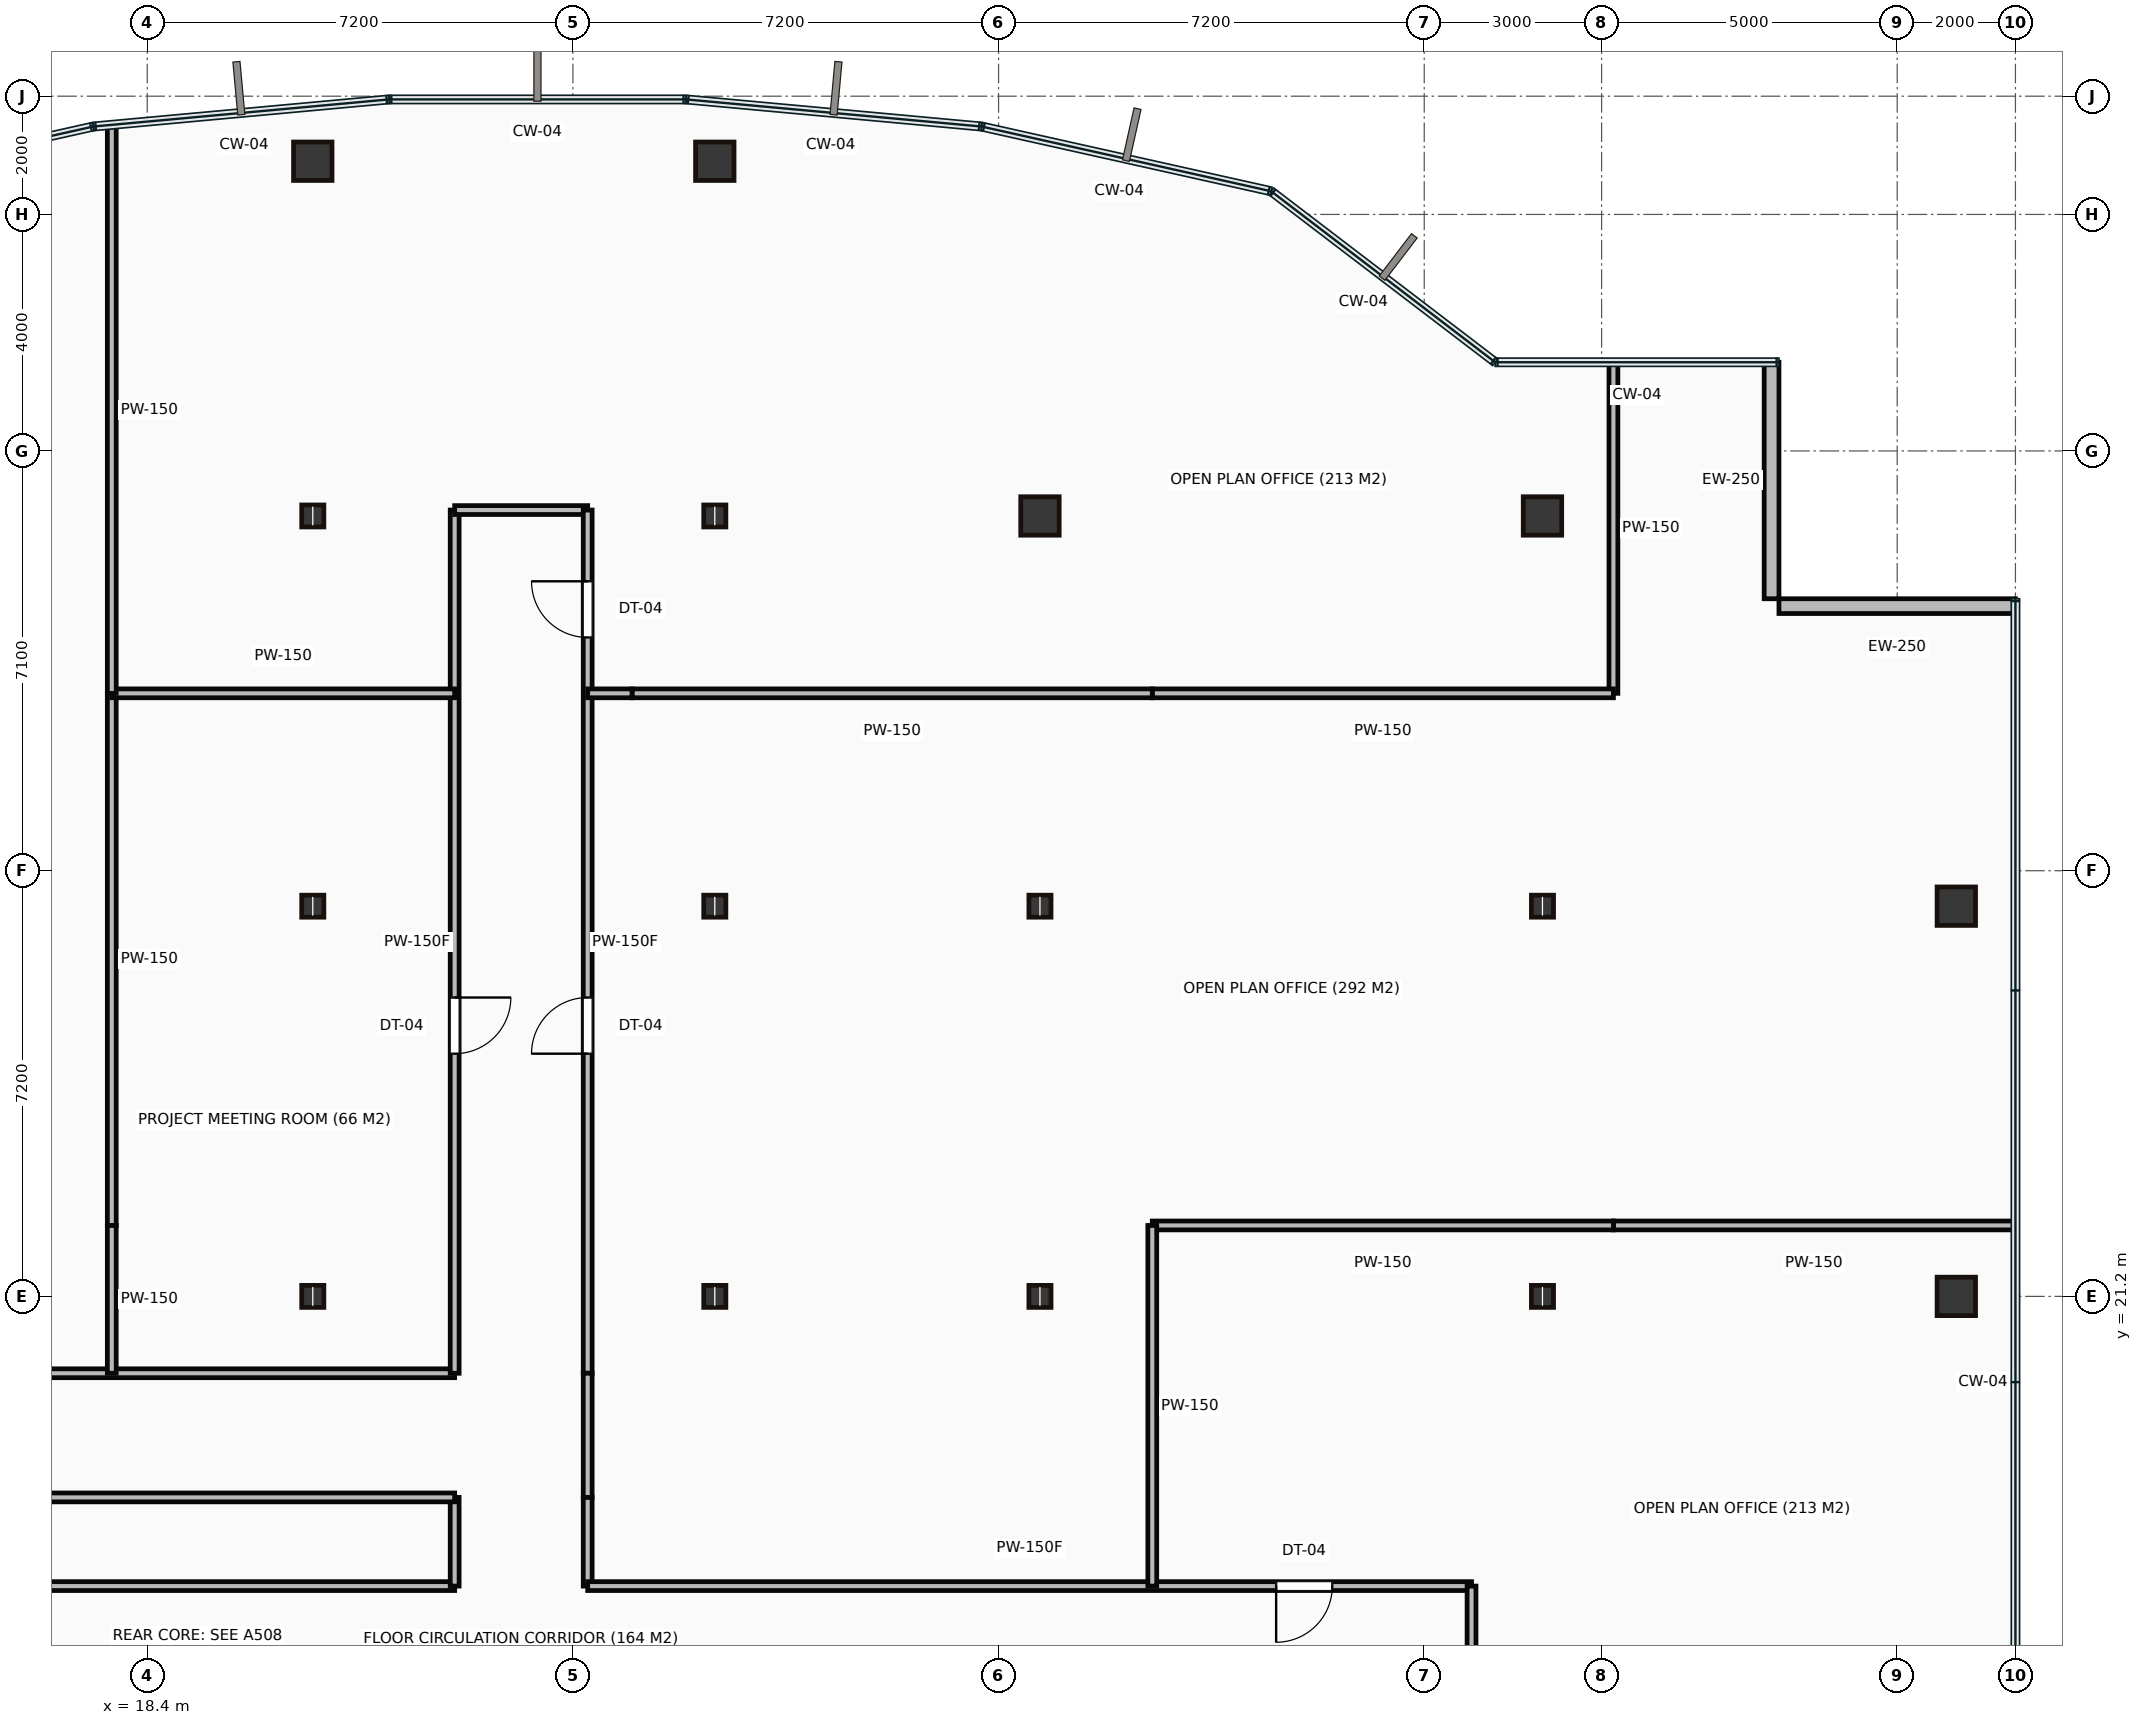
"""IFC4 building model, lengths in metres.
Left out: names, types, materials, properties, quantities, classifications, styles, units other than length and angle.
Written with IfcOpenShell. Run it as: python <this file> out.ifc"""

import sys

from ifc_helpers import new_model, si_unit, direction, frame, frame_2d, origin, origin_2d, place, context, subcontext, project, spatial, rectangle, hollow_rectangle, i_section, extrude, source, transform, mapped, element, fill, save


model = new_model("IFC4")
c1 = context("Model", 3, precision=1e-05, world=origin(), true_north=direction((0.0, 1.0)))
c2 = subcontext(c1, "Body", "Model", "MODEL_VIEW")
j1 = project(units=[si_unit("LENGTHUNIT", "METRE"), si_unit("PLANEANGLEUNIT", "RADIAN")], contexts=[c1])
p1 = place(None, origin())
s1 = spatial("IfcSite", under=j1, at=p1, CompositionType="ELEMENT")
p2 = place(p1, origin())
s2 = spatial("IfcBuilding", under=s1, at=p2, CompositionType="ELEMENT")
p3 = place(p2, frame((0.0, 0.0, 177.1)))
s3 = spatial("IfcBuildingStorey", under=s2, at=p3, CompositionType="ELEMENT", Elevation=177.1)
m1 = source(origin(), c2, "Body", "SweptSolid", [
    extrude(i_section(OverallWidth=0.374, OverallDepth=0.372, WebThickness=0.016, FlangeThickness=0.026, at=origin_2d()), origin(), (0.0, 0.0, 1.0), 3.65),
])
for number, where, z_axis, x_axis in (
    (1, (21.2, 21.2, 0.0), (0.0, 0.0, 1.0), (1.0, 0.0, 0.0)),
    (2, (21.2, 27.8, 0.0), (0.0, 0.0, 1.0), (1.0, 0.0, 0.0)),
    (3, (21.2, 34.4, 0.0), (0.0, 0.0, 1.0), (1.0, 0.0, 0.0)),
):
    element("IfcColumn", number, at=place(p3, frame(where, z_axis=z_axis, x_axis=x_axis)), inside=s3, PredefinedType="COLUMN", context=c2, shape_type="MappedRepresentation", body=[
        mapped(m1, transform((0.0, 0.0, 0.0))),
    ])
m2 = source(origin(), c2, "Body", "SweptSolid", [
    extrude(hollow_rectangle(XDim=0.65, YDim=0.65, WallThickness=0.032, at=origin_2d()), origin(), (0.0, 0.0, 1.0), 3.65),
])
p4 = place(p3, frame((21.2, 40.4, 0.0), z_axis=(0.0, 0.0, 1.0), x_axis=(1.0, 0.0, 0.0)))
e4 = element("IfcColumn", 4, at=p4, inside=s3, PredefinedType="COLUMN", context=c2, shape_type="MappedRepresentation", body=[
    mapped(m2, transform((0.0, 0.0, 0.0))),
])
for number, where, z_axis, x_axis in (
    (5, (28.0, 21.2, 0.0), (0.0, 0.0, 1.0), (1.0, 0.0, 0.0)),
    (6, (28.0, 27.8, 0.0), (0.0, 0.0, 1.0), (1.0, 0.0, 0.0)),
    (7, (28.0, 34.4, 0.0), (0.0, 0.0, 1.0), (1.0, 0.0, 0.0)),
):
    element("IfcColumn", number, at=place(p3, frame(where, z_axis=z_axis, x_axis=x_axis)), inside=s3, PredefinedType="COLUMN", context=c2, shape_type="MappedRepresentation", body=[
        mapped(m1, transform((0.0, 0.0, 0.0))),
    ])
p5 = place(p3, frame((28.0, 40.4, 0.0), z_axis=(0.0, 0.0, 1.0), x_axis=(1.0, 0.0, 0.0)))
e8 = element("IfcColumn", 8, at=p5, inside=s3, PredefinedType="COLUMN", context=c2, shape_type="MappedRepresentation", body=[
    mapped(m2, transform((0.0, 0.0, 0.0))),
])
for number, where, z_axis, x_axis in (
    (9, (33.5, 21.2, 0.0), (0.0, 0.0, 1.0), (1.0, 0.0, 0.0)),
    (10, (33.5, 27.8, 0.0), (0.0, 0.0, 1.0), (1.0, 0.0, 0.0)),
):
    element("IfcColumn", number, at=place(p3, frame(where, z_axis=z_axis, x_axis=x_axis)), inside=s3, PredefinedType="COLUMN", context=c2, shape_type="MappedRepresentation", body=[
        mapped(m1, transform((0.0, 0.0, 0.0))),
    ])
p6 = place(p3, frame((33.5, 34.4, 0.0), z_axis=(0.0, 0.0, 1.0), x_axis=(1.0, 0.0, 0.0)))
e11 = element("IfcColumn", 11, at=p6, inside=s3, PredefinedType="COLUMN", context=c2, shape_type="MappedRepresentation", body=[
    mapped(m2, transform((0.0, 0.0, 0.0))),
])
for number, where, z_axis, x_axis in (
    (12, (42.0, 21.2, 0.0), (0.0, 0.0, 1.0), (1.0, 0.0, 0.0)),
    (13, (42.0, 27.8, 0.0), (0.0, 0.0, 1.0), (1.0, 0.0, 0.0)),
):
    element("IfcColumn", number, at=place(p3, frame(where, z_axis=z_axis, x_axis=x_axis)), inside=s3, PredefinedType="COLUMN", context=c2, shape_type="MappedRepresentation", body=[
        mapped(m1, transform((0.0, 0.0, 0.0))),
    ])
for number, where, z_axis, x_axis in (
    (14, (42.0, 34.4, 0.0), (0.0, 0.0, 1.0), (1.0, 0.0, 0.0)),
    (15, (49.0, 21.2, 0.0), (0.0, 0.0, 1.0), (1.0, 0.0, 0.0)),
    (16, (49.0, 27.8, 0.0), (0.0, 0.0, 1.0), (1.0, 0.0, 0.0)),
):
    element("IfcColumn", number, at=place(p3, frame(where, z_axis=z_axis, x_axis=x_axis)), inside=s3, PredefinedType="COLUMN", context=c2, shape_type="MappedRepresentation", body=[
        mapped(m2, transform((0.0, 0.0, 0.0))),
    ])
m3 = source(origin(), c2, "Body", "SweptSolid", [
    extrude(rectangle(XDim=4.0, YDim=0.25, at=frame_2d((2.0, 0.0))), origin(), (0.0, 0.0, 1.0), 3.4),
])
for number, where, z_axis, x_axis in (
    (17, (50.0, 32.875, 0.0), (0.0, 0.0, 1.0), (-1.0, 0.0, 0.0)),
    (18, (45.875, 33.0, 0.0), (0.0, 0.0, 1.0), (0.0, 1.0, 0.0)),
):
    element("IfcWall", number, at=place(p3, frame(where, z_axis=z_axis, x_axis=x_axis)), inside=s3, PredefinedType="STANDARD", context=c2, shape_type="MappedRepresentation", body=[
        mapped(m3, transform((0.0, 0.0, 0.0))),
    ])
m4 = source(origin(), c2, "Body", "SweptSolid", [
    extrude(rectangle(XDim=19.0, YDim=0.15, at=frame_2d((9.5, 0.0))), origin(), (0.0, 0.0, 1.0), 3.4),
])
p7 = place(p3, frame((4.6, 16.3, 0.0), z_axis=(0.0, 0.0, 1.0), x_axis=(1.0, 0.0, 0.0)))
e19 = element("IfcWall", 19, at=p7, inside=s3, PredefinedType="PARTITIONING", context=c2, shape_type="MappedRepresentation", body=[
    mapped(m4, transform((0.0, 0.0, 0.0))),
])
p8 = place(p7, frame((9.025, 0.0, 0.0)))
e20 = element("IfcOpeningElement", 20, at=p8, cuts=e19, PredefinedType="OPENING", context=c2, shape_type="SweptSolid", body=[
    extrude(rectangle(XDim=0.95, YDim=2.15, at=frame_2d((0.475, 1.075))), frame((0.0, 0.085, 0.0), z_axis=(0.0, -1.0, 0.0), x_axis=(1.0, 0.0, 0.0)), (0.0, 0.0, 1.0), 0.17),
])
m5 = source(origin(), c2, "Body", "SweptSolid", [
    extrude(rectangle(XDim=1.5, YDim=0.15, at=frame_2d((0.75, 0.0))), origin(), (0.0, 0.0, 1.0), 3.4),
])
p9 = place(p3, frame((23.6, 16.3, 0.0), z_axis=(0.0, 0.0, 1.0), x_axis=(0.0, 1.0, 0.0)))
e21 = element("IfcWall", 21, at=p9, inside=s3, PredefinedType="PARTITIONING", context=c2, shape_type="MappedRepresentation", body=[
    mapped(m5, transform((0.0, 0.0, 0.0))),
])
for number, where, z_axis, x_axis in (
    (22, (23.6, 17.8, 0.0), (0.0, 0.0, 1.0), (-1.0, 0.0, 0.0)),
    (23, (4.6, 19.9, 0.0), (0.0, 0.0, 1.0), (1.0, 0.0, 0.0)),
):
    element("IfcWall", number, at=place(p3, frame(where, z_axis=z_axis, x_axis=x_axis)), inside=s3, PredefinedType="PARTITIONING", context=c2, shape_type="MappedRepresentation", body=[
        mapped(m4, transform((0.0, 0.0, 0.0))),
    ])
m6 = source(origin(), c2, "Body", "SweptSolid", [
    extrude(rectangle(XDim=14.6, YDim=0.15, at=frame_2d((7.3, 0.0))), origin(), (0.0, 0.0, 1.0), 3.4),
])
p10 = place(p3, frame((23.6, 19.9, 0.0), z_axis=(0.0, 0.0, 1.0), x_axis=(0.0, 1.0, 0.0)))
e24 = element("IfcWall", 24, at=p10, inside=s3, PredefinedType="PARTITIONING", context=c2, shape_type="MappedRepresentation", body=[
    mapped(m6, transform((0.0, 0.0, 0.0))),
])
p11 = place(p10, frame((5.405, 0.0, 0.0)))
e25 = element("IfcOpeningElement", 25, at=p11, cuts=e24, PredefinedType="OPENING", context=c2, shape_type="SweptSolid", body=[
    extrude(rectangle(XDim=0.95, YDim=2.15, at=frame_2d((0.475, 1.075))), frame((0.0, 0.085, 0.0), z_axis=(0.0, -1.0, 0.0), x_axis=(1.0, 0.0, 0.0)), (0.0, 0.0, 1.0), 0.17),
])
m7 = source(origin(), c2, "Body", "SweptSolid", [
    extrude(rectangle(XDim=2.25, YDim=0.15, at=frame_2d((1.125, 0.0))), origin(), (0.0, 0.0, 1.0), 2.76),
])
p12 = place(p3, frame((23.6, 34.5, 0.0), z_axis=(0.0, 0.0, 1.0), x_axis=(1.0, 0.0, 0.0)))
e26 = element("IfcWall", 26, at=p12, inside=s3, PredefinedType="PARTITIONING", context=c2, shape_type="MappedRepresentation", body=[
    mapped(m7, transform((0.0, 0.0, 0.0))),
])
p13 = place(p3, frame((25.85, 34.5, 0.0), z_axis=(0.0, 0.0, 1.0), x_axis=(0.0, -1.0, 0.0)))
e27 = element("IfcWall", 27, at=p13, inside=s3, PredefinedType="PARTITIONING", context=c2, shape_type="MappedRepresentation", body=[
    mapped(m6, transform((0.0, 0.0, 0.0))),
])
p14 = place(p13, frame((1.205, 0.0, 0.0)))
e28 = element("IfcOpeningElement", 28, at=p14, cuts=e27, PredefinedType="OPENING", context=c2, shape_type="SweptSolid", body=[
    extrude(rectangle(XDim=0.95, YDim=2.15, at=frame_2d((0.475, 1.075))), frame((0.0, 0.085, 0.0), z_axis=(0.0, -1.0, 0.0), x_axis=(1.0, 0.0, 0.0)), (0.0, 0.0, 1.0), 0.17),
])
p15 = place(p13, frame((8.245, 0.0, 0.0)))
e29 = element("IfcOpeningElement", 29, at=p15, cuts=e27, PredefinedType="OPENING", context=c2, shape_type="SweptSolid", body=[
    extrude(rectangle(XDim=0.95, YDim=2.15, at=frame_2d((0.475, 1.075))), frame((0.0, 0.085, 0.0), z_axis=(0.0, -1.0, 0.0), x_axis=(1.0, 0.0, 0.0)), (0.0, 0.0, 1.0), 0.17),
])
m8 = source(origin(), c2, "Body", "SweptSolid", [
    extrude(rectangle(XDim=2.1, YDim=0.15, at=frame_2d((1.05, 0.0))), origin(), (0.0, 0.0, 1.0), 3.4),
])
p16 = place(p3, frame((25.85, 19.9, 0.0), z_axis=(0.0, 0.0, 1.0), x_axis=(0.0, -1.0, 0.0)))
e30 = element("IfcWall", 30, at=p16, inside=s3, PredefinedType="PARTITIONING", context=c2, shape_type="MappedRepresentation", body=[
    mapped(m8, transform((0.0, 0.0, 0.0))),
])
p17 = place(p3, frame((25.85, 17.8, 0.0), z_axis=(0.0, 0.0, 1.0), x_axis=(0.0, -1.0, 0.0)))
e31 = element("IfcWall", 31, at=p17, inside=s3, PredefinedType="PARTITIONING", context=c2, shape_type="MappedRepresentation", body=[
    mapped(m5, transform((0.0, 0.0, 0.0))),
])
m9 = source(origin(), c2, "Body", "SweptSolid", [
    extrude(rectangle(XDim=14.95, YDim=0.15, at=frame_2d((7.475, 0.0))), origin(), (0.0, 0.0, 1.0), 3.4),
])
p18 = place(p3, frame((25.85, 16.3, 0.0), z_axis=(0.0, 0.0, 1.0), x_axis=(1.0, 0.0, 0.0)))
e32 = element("IfcWall", 32, at=p18, inside=s3, PredefinedType="PARTITIONING", context=c2, shape_type="MappedRepresentation", body=[
    mapped(m9, transform((0.0, 0.0, 0.0))),
])
p19 = place(p18, frame((11.645, 0.0, 0.0)))
e33 = element("IfcOpeningElement", 33, at=p19, cuts=e32, PredefinedType="OPENING", context=c2, shape_type="SweptSolid", body=[
    extrude(rectangle(XDim=0.95, YDim=2.15, at=frame_2d((0.475, 1.075))), frame((0.0, 0.085, 0.0), z_axis=(0.0, -1.0, 0.0), x_axis=(1.0, 0.0, 0.0)), (0.0, 0.0, 1.0), 0.17),
])
m10 = source(origin(), c2, "Body", "SweptSolid", [
    extrude(rectangle(XDim=2.3, YDim=0.15, at=frame_2d((1.15, 0.0))), origin(), (0.0, 0.0, 1.0), 3.4),
])
p20 = place(p3, frame((40.8, 16.3, 0.0), z_axis=(0.0, 0.0, 1.0), x_axis=(0.0, -1.0, 0.0)))
e34 = element("IfcWall", 34, at=p20, inside=s3, PredefinedType="PARTITIONING", context=c2, shape_type="MappedRepresentation", body=[
    mapped(m10, transform((0.0, 0.0, 0.0))),
])
m11 = source(origin(), c2, "Body", "SweptSolid", [
    extrude(rectangle(XDim=9.0, YDim=0.15, at=frame_2d((4.5, 0.0))), origin(), (0.0, 0.0, 1.0), 3.4),
])
p21 = place(p3, frame((17.8, 31.4, 0.0), z_axis=(0.0, 0.0, 1.0), x_axis=(0.0, -1.0, 0.0)))
e35 = element("IfcWall", 35, at=p21, inside=s3, PredefinedType="PARTITIONING", context=c2, shape_type="MappedRepresentation", body=[
    mapped(m11, transform((0.0, 0.0, 0.0))),
])
m12 = source(origin(), c2, "Body", "SweptSolid", [
    extrude(rectangle(XDim=2.5, YDim=0.15, at=frame_2d((1.25, 0.0))), origin(), (0.0, 0.0, 1.0), 3.4),
])
p22 = place(p3, frame((17.8, 22.4, 0.0), z_axis=(0.0, 0.0, 1.0), x_axis=(0.0, -1.0, 0.0)))
e36 = element("IfcWall", 36, at=p22, inside=s3, PredefinedType="PARTITIONING", context=c2, shape_type="MappedRepresentation", body=[
    mapped(m12, transform((0.0, 0.0, 0.0))),
])
m13 = source(origin(), c2, "Body", "SweptSolid", [
    extrude(rectangle(XDim=5.8, YDim=0.15, at=frame_2d((2.9, 0.0))), origin(), (0.0, 0.0, 1.0), 3.4),
])
p23 = place(p3, frame((17.8, 31.4, 0.0), z_axis=(0.0, 0.0, 1.0), x_axis=(1.0, 0.0, 0.0)))
e37 = element("IfcWall", 37, at=p23, inside=s3, PredefinedType="PARTITIONING", context=c2, shape_type="MappedRepresentation", body=[
    mapped(m13, transform((0.0, 0.0, 0.0))),
])
m14 = source(origin(), c2, "Body", "SweptSolid", [
    extrude(rectangle(XDim=9.596, YDim=0.15, at=frame_2d((4.798, 0.0))), origin(), (0.0, 0.0, 1.0), 3.4),
])
p24 = place(p3, frame((17.8, 40.996, 0.0), z_axis=(0.0, 0.0, 1.0), x_axis=(0.0, -1.0, 0.0)))
e38 = element("IfcWall", 38, at=p24, inside=s3, PredefinedType="PARTITIONING", context=c2, shape_type="MappedRepresentation", body=[
    mapped(m14, transform((0.0, 0.0, 0.0))),
])
m15 = source(origin(), c2, "Body", "SweptSolid", [
    extrude(rectangle(XDim=5.58, YDim=0.15, at=frame_2d((2.79, 0.0))), origin(), (0.0, 0.0, 1.0), 3.4),
])
p25 = place(p3, frame((43.2, 36.98, 0.0), z_axis=(0.0, 0.0, 1.0), x_axis=(0.0, -1.0, 0.0)))
e39 = element("IfcWall", 39, at=p25, inside=s3, PredefinedType="PARTITIONING", context=c2, shape_type="MappedRepresentation", body=[
    mapped(m15, transform((0.0, 0.0, 0.0))),
])
m16 = source(origin(), c2, "Body", "SweptSolid", [
    extrude(rectangle(XDim=7.8, YDim=0.15, at=frame_2d((3.9, 0.0))), origin(), (0.0, 0.0, 1.0), 3.4),
])
p26 = place(p3, frame((43.2, 31.4, 0.0), z_axis=(0.0, 0.0, 1.0), x_axis=(-1.0, 0.0, 0.0)))
e40 = element("IfcWall", 40, at=p26, inside=s3, PredefinedType="PARTITIONING", context=c2, shape_type="MappedRepresentation", body=[
    mapped(m16, transform((0.0, 0.0, 0.0))),
])
m17 = source(origin(), c2, "Body", "SweptSolid", [
    extrude(rectangle(XDim=8.8, YDim=0.15, at=frame_2d((4.4, 0.0))), origin(), (0.0, 0.0, 1.0), 3.4),
])
p27 = place(p3, frame((35.4, 31.4, 0.0), z_axis=(0.0, 0.0, 1.0), x_axis=(-1.0, 0.0, 0.0)))
e41 = element("IfcWall", 41, at=p27, inside=s3, PredefinedType="PARTITIONING", context=c2, shape_type="MappedRepresentation", body=[
    mapped(m17, transform((0.0, 0.0, 0.0))),
])
m18 = source(origin(), c2, "Body", "SweptSolid", [
    extrude(rectangle(XDim=0.75, YDim=0.15, at=frame_2d((0.375, 0.0))), origin(), (0.0, 0.0, 1.0), 3.4),
])
p28 = place(p3, frame((26.6, 31.4, 0.0), z_axis=(0.0, 0.0, 1.0), x_axis=(-1.0, 0.0, 0.0)))
e42 = element("IfcWall", 42, at=p28, inside=s3, PredefinedType="PARTITIONING", context=c2, shape_type="MappedRepresentation", body=[
    mapped(m18, transform((0.0, 0.0, 0.0))),
])
m19 = source(origin(), c2, "Body", "SweptSolid", [
    extrude(rectangle(XDim=6.78, YDim=0.15, at=frame_2d((3.39, 0.0))), origin(), (0.0, 0.0, 1.0), 3.4),
])
p29 = place(p3, frame((49.98, 22.4, 0.0), z_axis=(0.0, 0.0, 1.0), x_axis=(-1.0, 0.0, 0.0)))
e43 = element("IfcWall", 43, at=p29, inside=s3, PredefinedType="PARTITIONING", context=c2, shape_type="MappedRepresentation", body=[
    mapped(m19, transform((0.0, 0.0, 0.0))),
])
p30 = place(p3, frame((43.2, 22.4, 0.0), z_axis=(0.0, 0.0, 1.0), x_axis=(-1.0, 0.0, 0.0)))
e44 = element("IfcWall", 44, at=p30, inside=s3, PredefinedType="PARTITIONING", context=c2, shape_type="MappedRepresentation", body=[
    mapped(m16, transform((0.0, 0.0, 0.0))),
])
m20 = source(origin(), c2, "Body", "SweptSolid", [
    extrude(rectangle(XDim=6.1, YDim=0.15, at=frame_2d((3.05, 0.0))), origin(), (0.0, 0.0, 1.0), 3.4),
])
p31 = place(p3, frame((35.4, 22.4, 0.0), z_axis=(0.0, 0.0, 1.0), x_axis=(0.0, -1.0, 0.0)))
e45 = element("IfcWall", 45, at=p31, inside=s3, PredefinedType="PARTITIONING", context=c2, shape_type="MappedRepresentation", body=[
    mapped(m20, transform((0.0, 0.0, 0.0))),
])
m21 = source(origin(), c2, "Body", "SweptSolid", [
    extrude(rectangle(XDim=0.95, YDim=2.15, at=frame_2d((0.475, 1.075))), frame((0.0, 0.025, 0.0), z_axis=(0.0, -1.0, 0.0), x_axis=(1.0, 0.0, 0.0)), (0.0, 0.0, 1.0), 0.05),
])
p32 = place(p11, origin())
e46 = element("IfcDoor", 46, at=p32, inside=s3, OperationType="SINGLE_SWING_RIGHT", PredefinedType="DOOR", context=c2, shape_type="MappedRepresentation", body=[
    mapped(m21, transform((0.0, 0.0, 0.0))),
])
fill(e25, e46)
p33 = place(p14, origin())
e47 = element("IfcDoor", 47, at=p33, inside=s3, OperationType="SINGLE_SWING_LEFT", PredefinedType="DOOR", context=c2, shape_type="MappedRepresentation", body=[
    mapped(m21, transform((0.0, 0.0, 0.0))),
])
fill(e28, e47)
p34 = place(p15, origin())
e48 = element("IfcDoor", 48, at=p34, inside=s3, OperationType="SINGLE_SWING_RIGHT", PredefinedType="DOOR", context=c2, shape_type="MappedRepresentation", body=[
    mapped(m21, transform((0.0, 0.0, 0.0))),
])
fill(e29, e48)
p35 = place(p19, origin())
e49 = element("IfcDoor", 49, at=p35, inside=s3, OperationType="SINGLE_SWING_LEFT", PredefinedType="DOOR", context=c2, shape_type="MappedRepresentation", body=[
    mapped(m21, transform((0.0, 0.0, 0.0))),
])
fill(e33, e49)
save(model, sys.argv[1])
